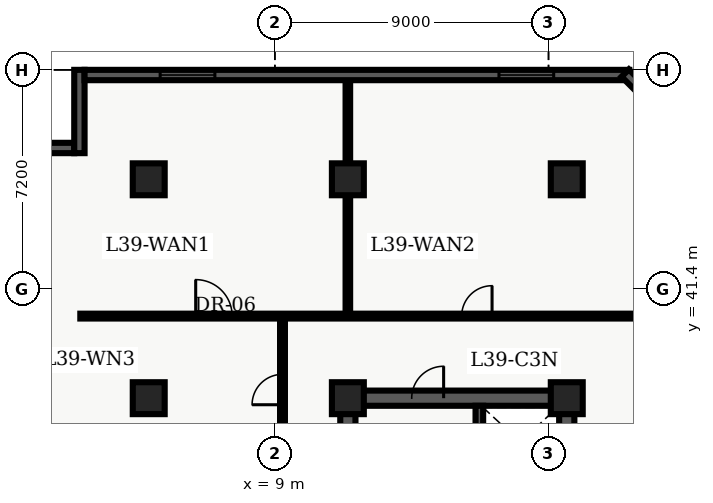
"""IFC4 building model, lengths in metres.
Left out: names, types, materials, properties, quantities, classifications, styles, units other than length and angle.
Written with IfcOpenShell. Run it as: python <this file> out.ifc"""

import sys

from ifc_helpers import new_model, entity, si_unit, converted_unit, direction, frame, origin_with_axes, origin_2d_with_axis, place, context, subcontext, project, spatial, polyline, rectangle, outline, extrude, element, fill, save


model = new_model("IFC4")
c1 = context("Model", 3, precision=1e-05, world=origin_with_axes(), true_north=direction((0.0, 1.0)))
c2 = subcontext(c1, "Body", "Model", "MODEL_VIEW")
j1 = project(units=[si_unit("LENGTHUNIT", "METRE"), converted_unit("PLANEANGLEUNIT", "DEGREE", entity("IfcPlaneAngleMeasure", 0.017), si_unit("PLANEANGLEUNIT", "RADIAN"), dimensions=[0, 0, 0, 0, 0, 0, 0])], contexts=[c1])
p1 = place(None, origin_with_axes())
s1 = spatial("IfcSite", under=j1, at=p1, CompositionType="ELEMENT")
p2 = place(p1, origin_with_axes())
s2 = spatial("IfcBuilding", under=s1, at=p2, CompositionType="ELEMENT")
p3 = place(p2, frame((0.0, 0.0, 160.2), z_axis=(0.0, 0.0, 1.0), x_axis=(1.0, 0.0, 0.0)))
s3 = spatial("IfcBuildingStorey", under=s2, at=p3, CompositionType="ELEMENT", Elevation=160.2)
p4 = place(p3, frame((11.4, 10.8, 0.0), z_axis=(0.0, 0.0, 1.0), x_axis=(0.0, 1.0, 0.0)))
e1 = element("IfcWall", 1, at=p4, inside=s3, PredefinedType="SHEAR", context=c2, shape_type="SweptSolid", body=[
    extrude(outline(polyline([(0.0, -0.25), (27.0, -0.25), (27.0, 0.25), (0.0, 0.25), (0.0, -0.25)])), origin_with_axes(), (0.0, 0.0, 1.0), 3.66),
])
p5 = place(p3, frame((11.4, 37.8, 0.0), z_axis=(0.0, 0.0, 1.0), x_axis=(1.0, 0.0, 0.0)))
e2 = element("IfcWall", 2, at=p5, inside=s3, PredefinedType="SHEAR", context=c2, shape_type="SweptSolid", body=[
    extrude(outline(polyline([(0.0, -0.25), (7.2, -0.25), (7.2, 0.25), (0.0, 0.25), (0.0, -0.25)])), origin_with_axes(), (0.0, 0.0, 1.0), 3.66),
])
p6 = place(p5, frame((2.625, 0.0, 0.0), z_axis=(0.0, 0.0, 1.0), x_axis=(1.0, 0.0, 0.0)))
e3 = element("IfcOpeningElement", 3, at=p6, cuts=e2, PredefinedType="OPENING", context=c2, shape_type="SweptSolid", body=[
    extrude(rectangle(XDim=1.05, YDim=0.52, at=origin_2d_with_axis()), origin_with_axes(), (0.0, 0.0, 1.0), 2.15),
])
p7 = place(p3, frame((18.6, 24.3, 0.0), z_axis=(0.0, 0.0, 1.0), x_axis=(0.0, 1.0, 0.0)))
e4 = element("IfcWall", 4, at=p7, inside=s3, PredefinedType="SHEAR", context=c2, shape_type="SweptSolid", body=[
    extrude(outline(polyline([(0.0, -0.25), (13.5, -0.25), (13.5, 0.25), (0.0, 0.25), (0.0, -0.25)])), origin_with_axes(), (0.0, 0.0, 1.0), 3.66),
])
p8 = place(p7, frame((5.65, 0.0, 0.0), z_axis=(0.0, 0.0, 1.0), x_axis=(1.0, 0.0, 0.0)))
e5 = element("IfcOpeningElement", 5, at=p8, cuts=e4, PredefinedType="OPENING", context=c2, shape_type="SweptSolid", body=[
    extrude(rectangle(XDim=1.1, YDim=0.52, at=origin_2d_with_axis()), origin_with_axes(), (0.0, 0.0, 1.0), 2.15),
])
p9 = place(p7, frame((7.75, 0.0, 0.0), z_axis=(0.0, 0.0, 1.0), x_axis=(1.0, 0.0, 0.0)))
e6 = element("IfcOpeningElement", 6, at=p9, cuts=e4, PredefinedType="OPENING", context=c2, shape_type="SweptSolid", body=[
    extrude(rectangle(XDim=1.1, YDim=0.52, at=origin_2d_with_axis()), origin_with_axes(), (0.0, 0.0, 1.0), 2.15),
])
p10 = place(p3, frame((15.725, 28.9, 0.0), z_axis=(0.0, 0.0, 1.0), x_axis=(0.0, 1.0, 0.0)))
e7 = element("IfcWall", 7, at=p10, inside=s3, PredefinedType="SHEAR", context=c2, shape_type="SweptSolid", body=[
    extrude(outline(polyline([(0.0, -0.125), (8.65, -0.125), (8.65, 0.125), (0.0, 0.125), (0.0, -0.125)])), origin_with_axes(), (0.0, 0.0, 1.0), 3.66),
])
for number, where, z_axis, x_axis in (
    (8, (11.4, 37.8, 0.0), (0.0, 0.0, 1.0), (1.0, 0.0, 0.0)),
    (9, (11.4, 45.0, 0.0), (0.0, 0.0, 1.0), (1.0, 0.0, 0.0)),
    (10, (18.6, 37.8, 0.0), (0.0, 0.0, 1.0), (1.0, 0.0, 0.0)),
    (11, (18.6, 45.0, 0.0), (0.0, 0.0, 1.0), (1.0, 0.0, 0.0)),
    (12, (4.85, 37.8, 0.0), (0.0, 0.0, 1.0), (1.0, 0.0, 0.0)),
    (13, (4.85, 45.0, 0.0), (0.0, 0.0, 1.0), (1.0, 0.0, 0.0)),
):
    element("IfcColumn", number, at=place(p3, frame(where, z_axis=z_axis, x_axis=x_axis)), inside=s3, PredefinedType="COLUMN", context=c2, shape_type="SweptSolid", body=[
        extrude(rectangle(XDim=1.05, YDim=1.05, at=origin_2d_with_axis()), origin_with_axes(), (0.0, 0.0, 1.0), 3.9),
    ])
p11 = place(p3, frame((2.6, 40.5, 0.0), z_axis=(0.0, 0.0, 1.0), x_axis=(1.0, 0.0, 0.0)))
e14 = element("IfcWall", 14, at=p11, inside=s3, PredefinedType="PARTITIONING", context=c2, shape_type="SweptSolid", body=[
    extrude(outline(polyline([(0.0, -0.08), (20.481, -0.08), (20.481, 0.08), (0.0, 0.08), (0.0, -0.08)])), origin_with_axes(), (0.0, 0.0, 1.0), 2.7),
])
p12 = place(p11, frame((4.395, 0.0, 0.0), z_axis=(0.0, 0.0, 1.0), x_axis=(1.0, 0.0, 0.0)))
e15 = element("IfcOpeningElement", 15, at=p12, cuts=e14, PredefinedType="OPENING", context=c2, shape_type="SweptSolid", body=[
    extrude(rectangle(XDim=1.2, YDim=0.18, at=origin_2d_with_axis()), origin_with_axes(), (0.0, 0.0, 1.0), 2.2),
])
p13 = place(p11, frame((13.043, 0.0, 0.0), z_axis=(0.0, 0.0, 1.0), x_axis=(1.0, 0.0, 0.0)))
e16 = element("IfcOpeningElement", 16, at=p13, cuts=e14, PredefinedType="OPENING", context=c2, shape_type="SweptSolid", body=[
    extrude(rectangle(XDim=1.0, YDim=0.18, at=origin_2d_with_axis()), origin_with_axes(), (0.0, 0.0, 1.0), 2.15),
])
p14 = place(p3, frame((9.25, 24.4, 0.0), z_axis=(0.0, 0.0, 1.0), x_axis=(0.0, 1.0, 0.0)))
e17 = element("IfcWall", 17, at=p14, inside=s3, PredefinedType="PARTITIONING", context=c2, shape_type="SweptSolid", body=[
    extrude(outline(polyline([(0.0, -0.08), (16.1, -0.08), (16.1, 0.08), (0.0, 0.08), (0.0, -0.08)])), origin_with_axes(), (0.0, 0.0, 1.0), 2.7),
])
p15 = place(p14, frame((3.808, 0.0, 0.0), z_axis=(0.0, 0.0, 1.0), x_axis=(1.0, 0.0, 0.0)))
e18 = element("IfcOpeningElement", 18, at=p15, cuts=e17, PredefinedType="OPENING", context=c2, shape_type="SweptSolid", body=[
    extrude(rectangle(XDim=1.0, YDim=0.18, at=origin_2d_with_axis()), origin_with_axes(), (0.0, 0.0, 1.0), 2.15),
])
p16 = place(p14, frame((9.467, 0.0, 0.0), z_axis=(0.0, 0.0, 1.0), x_axis=(1.0, 0.0, 0.0)))
e19 = element("IfcOpeningElement", 19, at=p16, cuts=e17, PredefinedType="OPENING", context=c2, shape_type="SweptSolid", body=[
    extrude(rectangle(XDim=1.0, YDim=0.18, at=origin_2d_with_axis()), origin_with_axes(), (0.0, 0.0, 1.0), 2.15),
])
p17 = place(p14, frame((13.684, 0.0, 0.0), z_axis=(0.0, 0.0, 1.0), x_axis=(1.0, 0.0, 0.0)))
e20 = element("IfcOpeningElement", 20, at=p17, cuts=e17, PredefinedType="OPENING", context=c2, shape_type="SweptSolid", body=[
    extrude(rectangle(XDim=1.0, YDim=0.18, at=origin_2d_with_axis()), origin_with_axes(), (0.0, 0.0, 1.0), 2.15),
])
p18 = place(p3, frame((11.4, 40.6, 0.0), z_axis=(0.0, 0.0, 1.0), x_axis=(0.0, 1.0, 0.0)))
e21 = element("IfcWall", 21, at=p18, inside=s3, PredefinedType="PARTITIONING", context=c2, shape_type="SweptSolid", body=[
    extrude(outline(polyline([(0.0, -0.075), (7.665, -0.075), (7.665, 0.075), (0.0, 0.075), (0.0, -0.075)])), origin_with_axes(), (0.0, 0.0, 1.0), 2.7),
])
p19 = place(p3, frame((0.34, 46.03, 0.0), z_axis=(0.0, 0.0, 1.0), x_axis=(1.0, 0.0, 0.0)))
e22 = element("IfcWall", 22, at=p19, inside=s3, PredefinedType="SOLIDWALL", context=c2, shape_type="SweptSolid", body=[
    extrude(outline(polyline([(0.0, -0.17), (2.06, -0.17), (2.06, 0.17), (0.0, 0.17), (0.0, -0.17)])), origin_with_axes(), (0.0, 0.0, 1.0), 3.66),
])
p20 = place(p3, frame((2.57, 45.86, 0.0), z_axis=(0.0, 0.0, 1.0), x_axis=(0.0, 1.0, 0.0)))
e23 = element("IfcWall", 23, at=p20, inside=s3, PredefinedType="SOLIDWALL", context=c2, shape_type="SweptSolid", body=[
    extrude(outline(polyline([(0.0, -0.17), (2.74, -0.17), (2.74, 0.17), (0.0, 0.17), (0.0, -0.17)])), origin_with_axes(), (0.0, 0.0, 1.0), 3.66),
])
p21 = place(p3, frame((2.74, 48.43, 0.0), z_axis=(0.0, 0.0, 1.0), x_axis=(1.0, 0.0, 0.0)))
e24 = element("IfcWall", 24, at=p21, inside=s3, PredefinedType="SOLIDWALL", context=c2, shape_type="SweptSolid", body=[
    extrude(outline(polyline([(0.0, -0.17), (17.916, -0.17), (17.916, 0.17), (0.0, 0.17), (0.0, -0.17)])), origin_with_axes(), (0.0, 0.0, 1.0), 3.66),
])
p22 = place(p21, frame((3.386, 0.0, 0.45), z_axis=(0.0, 0.0, 1.0), x_axis=(1.0, 0.0, 0.0)))
e25 = element("IfcOpeningElement", 25, at=p22, cuts=e24, PredefinedType="OPENING", context=c2, shape_type="SweptSolid", body=[
    extrude(rectangle(XDim=1.8, YDim=0.36, at=origin_2d_with_axis()), origin_with_axes(), (0.0, 0.0, 1.0), 2.1),
])
p23 = place(p21, frame((14.53, 0.0, 0.45), z_axis=(0.0, 0.0, 1.0), x_axis=(1.0, 0.0, 0.0)))
e26 = element("IfcOpeningElement", 26, at=p23, cuts=e24, PredefinedType="OPENING", context=c2, shape_type="SweptSolid", body=[
    extrude(rectangle(XDim=1.8, YDim=0.36, at=origin_2d_with_axis()), origin_with_axes(), (0.0, 0.0, 1.0), 2.1),
])
p24 = place(p3, frame((20.522, 48.494, 0.0), z_axis=(0.0, 0.0, 1.0), x_axis=(0.707107, -0.707107, 0.0)))
e27 = element("IfcWall", 27, at=p24, inside=s3, PredefinedType="SOLIDWALL", context=c2, shape_type="SweptSolid", body=[
    extrude(outline(polyline([(0.0, -0.17), (3.923, -0.17), (3.923, 0.17), (0.0, 0.17), (0.0, -0.17)])), origin_with_axes(), (0.0, 0.0, 1.0), 3.66),
])
p25 = place(p5, frame((2.625, 0.0, 0.0), z_axis=(0.0, 0.0, 1.0), x_axis=(1.0, 0.0, 0.0)))
e28 = element("IfcDoor", 28, at=p25, inside=s3, OperationType="SINGLE_SWING_RIGHT", PredefinedType="DOOR", context=c2, shape_type="SweptSolid", body=[
    extrude(rectangle(XDim=1.05, YDim=0.09, at=origin_2d_with_axis()), origin_with_axes(), (0.0, 0.0, 1.0), 2.15),
])
fill(e3, e28)
p26 = place(p14, frame((13.684, 0.0, 0.0), z_axis=(0.0, 0.0, 1.0), x_axis=(1.0, 0.0, 0.0)))
e29 = element("IfcDoor", 29, at=p26, inside=s3, OperationType="SINGLE_SWING_LEFT", PredefinedType="DOOR", context=c2, shape_type="SweptSolid", body=[
    extrude(rectangle(XDim=1.0, YDim=0.09, at=origin_2d_with_axis()), origin_with_axes(), (0.0, 0.0, 1.0), 2.15),
])
fill(e20, e29)
p27 = place(p11, frame((4.395, 0.0, 0.0), z_axis=(0.0, 0.0, 1.0), x_axis=(1.0, 0.0, 0.0)))
e30 = element("IfcDoor", 30, at=p27, inside=s3, OperationType="SINGLE_SWING_LEFT", PredefinedType="DOOR", context=c2, shape_type="SweptSolid", body=[
    extrude(rectangle(XDim=1.2, YDim=0.09, at=origin_2d_with_axis()), origin_with_axes(), (0.0, 0.0, 1.0), 2.2),
])
fill(e15, e30)
p28 = place(p11, frame((13.043, 0.0, 0.0), z_axis=(0.0, 0.0, 1.0), x_axis=(1.0, 0.0, 0.0)))
e31 = element("IfcDoor", 31, at=p28, inside=s3, OperationType="SINGLE_SWING_RIGHT", PredefinedType="DOOR", context=c2, shape_type="SweptSolid", body=[
    extrude(rectangle(XDim=1.0, YDim=0.09, at=origin_2d_with_axis()), origin_with_axes(), (0.0, 0.0, 1.0), 2.15),
])
fill(e16, e31)
p29 = place(p21, frame((3.386, 0.0, 0.45), z_axis=(0.0, 0.0, 1.0), x_axis=(1.0, 0.0, 0.0)))
e32 = element("IfcWindow", 32, at=p29, inside=s3, PredefinedType="WINDOW", context=c2, shape_type="SweptSolid", body=[
    extrude(rectangle(XDim=1.8, YDim=0.09, at=origin_2d_with_axis()), origin_with_axes(), (0.0, 0.0, 1.0), 2.1),
])
fill(e25, e32)
p30 = place(p21, frame((14.53, 0.0, 0.45), z_axis=(0.0, 0.0, 1.0), x_axis=(1.0, 0.0, 0.0)))
e33 = element("IfcWindow", 33, at=p30, inside=s3, PredefinedType="WINDOW", context=c2, shape_type="SweptSolid", body=[
    extrude(rectangle(XDim=1.8, YDim=0.09, at=origin_2d_with_axis()), origin_with_axes(), (0.0, 0.0, 1.0), 2.1),
])
fill(e26, e33)
save(model, sys.argv[1])
